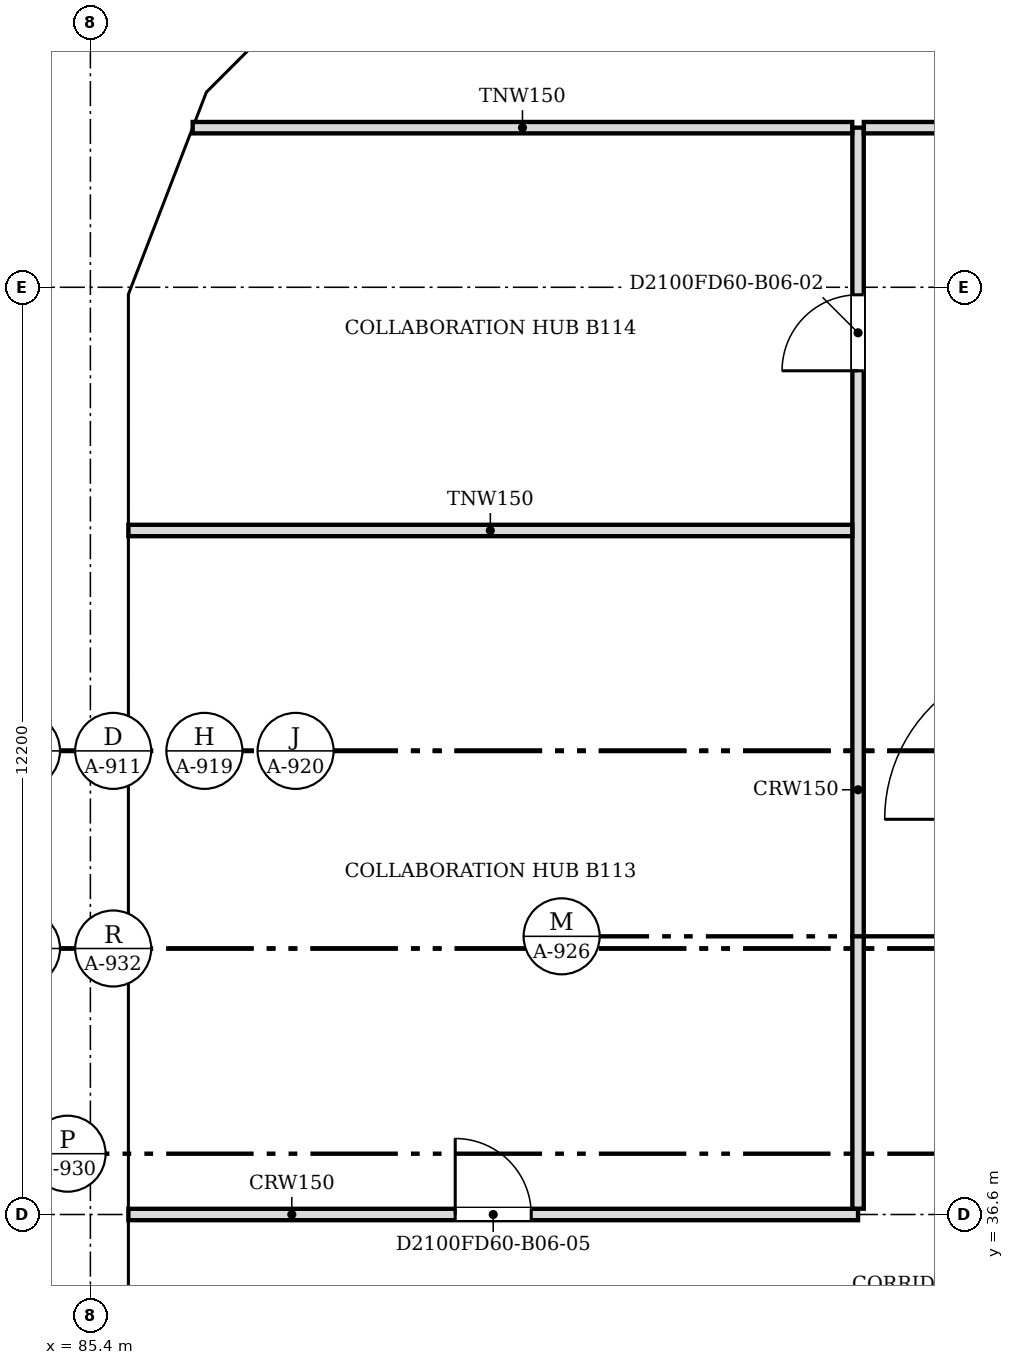
"""IFC4 building model, lengths in metres.
Left out: names, types, materials, properties, quantities, classifications, styles, units other than length and angle.
Written with IfcOpenShell. Run it as: python <this file> out.ifc"""

import sys

from ifc_helpers import new_model, si_unit, direction, frame, frame_2d, origin, place, context, subcontext, project, spatial, polyline, rectangle, outline, extrude, faceted_brep, source, transform, mapped, element, fill, save


model = new_model("IFC4")
c1 = context("Model", 3, precision=1e-05, world=origin(), true_north=direction((0.0, 1.0)))
c2 = subcontext(c1, "Body", "Model", "MODEL_VIEW")
j1 = project(units=[si_unit("LENGTHUNIT", "METRE"), si_unit("PLANEANGLEUNIT", "RADIAN")], contexts=[c1])
p1 = place(None, origin())
s1 = spatial("IfcSite", under=j1, at=p1, CompositionType="ELEMENT")
p2 = place(p1, origin())
s2 = spatial("IfcBuilding", under=s1, at=p2, CompositionType="ELEMENT")
p3 = place(p2, frame((0.0, 0.0, 60.0)))
s3 = spatial("IfcBuildingStorey", under=s2, at=p3, CompositionType="ELEMENT", Elevation=60.0)
m1 = source(origin(), c2, "Body", "Brep", [
    faceted_brep([(0.053, -0.25, 0.0), (2.997, -0.25, 3.8), (0.053, -0.25, 7.6), (0.0, -0.25, 7.532), (0.0, -0.25, 0.068), (0.106, 0.25, 7.532), (2.944, 0.25, 3.868), (2.944, 0.25, 3.732), (0.106, 0.25, 0.068), (2.997, 0.0, 3.8), (0.053, 0.0, 0.0), (0.053, 0.0, 7.6)], [[[0, 1, 2, 3, 4]], [[5, 6, 7, 8]], [[8, 7, 9, 1, 0, 10]], [[6, 5, 11, 2, 1, 9]], [[3, 2, 11]], [[10, 0, 4]], [[8, 10, 4, 3, 11, 5]], [[9, 7, 6]]]),
])
p4 = place(p3, frame((88.831, 53.625, -3.8), z_axis=(0.0, 0.0, 1.0), x_axis=(-0.707147509625, -0.707066050402, 0.0)))
e1 = element("IfcWall", 1, at=p4, inside=s3, PredefinedType="SOLIDWALL", context=c2, shape_type="MappedRepresentation", body=[
    mapped(m1, transform((0.0, 0.0, 0.0), scale=1.0)),
])
m2 = source(origin(), c2, "Body", "SweptSolid", [
    extrude(outline(polyline([(0.253, 0.666), (2.681, 3.8), (0.253, 6.934), (0.253, 0.666)])), frame((0.0, 0.26, 0.0), z_axis=(0.0, -1.0, 0.0), x_axis=(1.0, 0.0, 0.0)), (0.0, 0.0, 1.0), 0.52),
])
p5 = place(p4, origin())
e2 = element("IfcOpeningElement", 2, at=p5, cuts=e1, PredefinedType="OPENING", context=c2, shape_type="MappedRepresentation", body=[
    mapped(m2, transform((0.0, 0.0, 0.0), scale=1.0)),
])
m3 = source(origin(), c2, "Body", "Brep", [
    faceted_brep([(2.95, -0.25, 0.0), (2.997, -0.25, 0.059), (2.997, -0.25, 7.541), (2.95, -0.25, 7.6), (0.0, -0.25, 3.8), (0.053, 0.25, 3.868), (2.904, 0.25, 7.54), (2.904, 0.25, 0.06), (0.053, 0.25, 3.732), (2.95, 0.0, 0.0), (2.95, 0.0, 7.6), (0.0, 0.0, 3.8)], [[[0, 1, 2, 3, 4]], [[5, 6, 7, 8]], [[1, 0, 9]], [[10, 3, 2]], [[6, 5, 11, 4, 3, 10]], [[8, 7, 9, 0, 4, 11]], [[8, 11, 5]], [[1, 9, 7, 6, 10, 2]]]),
])
p6 = place(p3, frame((86.712, 51.506, -3.8), z_axis=(0.0, 0.0, 1.0), x_axis=(-0.359874094142, -0.933000876937, 0.0)))
e3 = element("IfcWall", 3, at=p6, inside=s3, PredefinedType="SOLIDWALL", context=c2, shape_type="MappedRepresentation", body=[
    mapped(m3, transform((0.0, 0.0, 0.0), scale=1.0)),
])
m4 = source(origin(), c2, "Body", "SweptSolid", [
    extrude(outline(polyline([(2.75, 6.935), (0.316, 3.8), (2.75, 0.665), (2.75, 6.935)])), frame((0.0, 0.26, 0.0), z_axis=(0.0, -1.0, 0.0), x_axis=(1.0, 0.0, 0.0)), (0.0, 0.0, 1.0), 0.52),
])
p7 = place(p6, origin())
e4 = element("IfcOpeningElement", 4, at=p7, cuts=e3, PredefinedType="OPENING", context=c2, shape_type="MappedRepresentation", body=[
    mapped(m4, transform((0.0, 0.0, 0.0), scale=1.0)),
])
m5 = source(origin(), c2, "Body", "Brep", [
    faceted_brep([(0.047, -0.25, 0.0), (3.05, -0.25, 3.8), (0.047, -0.25, 7.6), (0.0, -0.25, 7.54), (0.0, -0.25, 0.06), (0.093, 0.25, 7.541), (3.05, 0.25, 3.8), (0.093, 0.25, 0.059), (0.047, 0.0, 0.0), (0.047, 0.0, 7.6)], [[[0, 1, 2, 3, 4]], [[5, 6, 7]], [[7, 6, 1, 0, 8]], [[6, 5, 9, 2, 1]], [[3, 2, 9]], [[8, 0, 4]], [[7, 8, 4, 3, 9, 5]]]),
])
p8 = place(p3, frame((85.65, 48.8, -3.8), z_axis=(0.0, 0.0, 1.0), x_axis=(0.0, -1.0, 0.0)))
e5 = element("IfcWall", 5, at=p8, inside=s3, PredefinedType="SOLIDWALL", context=c2, shape_type="MappedRepresentation", body=[
    mapped(m5, transform((0.0, 0.0, 0.0), scale=1.0)),
])
m6 = source(origin(), c2, "Body", "SweptSolid", [
    extrude(outline(polyline([(0.247, 0.656), (2.731, 3.8), (0.247, 6.944), (0.247, 0.656)])), frame((0.0, 0.26, 0.0), z_axis=(0.0, -1.0, 0.0), x_axis=(1.0, 0.0, 0.0)), (0.0, 0.0, 1.0), 0.52),
])
p9 = place(p8, origin())
e6 = element("IfcOpeningElement", 6, at=p9, cuts=e5, PredefinedType="OPENING", context=c2, shape_type="MappedRepresentation", body=[
    mapped(m6, transform((0.0, 0.0, 0.0), scale=1.0)),
])
m7 = source(origin(), c2, "Body", "SweptSolid", [
    extrude(outline(polyline([(3.05, 0.0), (6.1, 3.8), (3.05, 7.6), (0.0, 3.8), (3.05, 0.0)])), frame((0.0, 0.25, 0.0), z_axis=(0.0, -1.0, 0.0), x_axis=(1.0, 0.0, 0.0)), (0.0, 0.0, 1.0), 0.5),
])
p10 = place(p3, frame((85.65, 45.75, -3.8), z_axis=(0.0, 0.0, 1.0), x_axis=(0.0, -1.0, 0.0)))
e7 = element("IfcWall", 7, at=p10, inside=s3, PredefinedType="SOLIDWALL", context=c2, shape_type="MappedRepresentation", body=[
    mapped(m7, transform((0.0, 0.0, 0.0), scale=1.0)),
])
m8 = source(origin(), c2, "Body", "SweptSolid", [
    extrude(outline(polyline([(3.05, 0.399), (5.78, 3.8), (3.05, 7.201), (0.321, 3.8), (3.05, 0.399)])), frame((0.0, 0.26, 0.0), z_axis=(0.0, -1.0, 0.0), x_axis=(1.0, 0.0, 0.0)), (0.0, 0.0, 1.0), 0.52),
])
p11 = place(p10, origin())
e8 = element("IfcOpeningElement", 8, at=p11, cuts=e7, PredefinedType="OPENING", context=c2, shape_type="MappedRepresentation", body=[
    mapped(m8, transform((0.0, 0.0, 0.0), scale=1.0)),
])
m9 = source(origin(), c2, "Body", "Brep", [
    faceted_brep([(3.05, -0.25, 0.0), (6.1, -0.25, 3.8), (6.1, -0.25, 3.8), (3.05, -0.25, 7.6), (0.0, -0.25, 3.8), (0.0, 0.25, 3.8), (3.05, 0.25, 7.6), (6.1, 0.25, 3.8), (6.1, 0.25, 3.8), (3.05, 0.25, 0.0)], [[[0, 1, 2, 3, 4]], [[5, 6, 7, 8, 9]], [[9, 8, 1, 0]], [[7, 6, 3, 2]], [[6, 5, 4, 3]], [[5, 9, 0, 4]], [[1, 8, 7, 2]]]),
])
p12 = place(p3, frame((85.65, 39.65, -3.8), z_axis=(0.0, 0.0, 1.0), x_axis=(0.0, -1.0, 0.0)))
e9 = element("IfcWall", 9, at=p12, inside=s3, PredefinedType="SOLIDWALL", context=c2, shape_type="MappedRepresentation", body=[
    mapped(m9, transform((0.0, 0.0, 0.0), scale=1.0)),
])
p13 = place(p12, origin())
e10 = element("IfcOpeningElement", 10, at=p13, cuts=e9, PredefinedType="OPENING", context=c2, shape_type="MappedRepresentation", body=[
    mapped(m8, transform((0.0, 0.0, 0.0), scale=1.0)),
])
m10 = source(origin(), c2, "Body", "Brep", [
    faceted_brep([(2.944, -0.25, 0.0), (2.997, -0.25, 0.068), (2.997, -0.25, 3.8), (0.0, -0.25, 3.8), (0.053, 0.25, 3.8), (2.891, 0.25, 3.8), (2.891, 0.25, 0.068), (0.053, 0.25, 3.732), (2.944, 0.0, 0.0), (0.0, 0.0, 3.8)], [[[0, 1, 2, 3]], [[4, 5, 6, 7]], [[1, 0, 8]], [[5, 4, 9, 3, 2]], [[7, 6, 8, 0, 3, 9]], [[7, 9, 4]], [[1, 8, 6, 5, 2]]]),
])
p14 = place(p3, frame((88.794, 53.588, 0.0), z_axis=(0.0, 0.0, 1.0), x_axis=(-0.707066050402, -0.707147509625, 0.0)))
e11 = element("IfcWall", 11, at=p14, inside=s3, PredefinedType="SOLIDWALL", context=c2, shape_type="MappedRepresentation", body=[
    mapped(m10, transform((0.0, 0.0, 0.0), scale=1.0)),
])
m11 = source(origin(), c2, "Body", "SweptSolid", [
    extrude(outline(polyline([(2.744, 3.55), (0.51, 3.55), (2.744, 0.666), (2.744, 3.55)])), frame((0.0, 0.26, 0.0), z_axis=(0.0, -1.0, 0.0), x_axis=(1.0, 0.0, 0.0)), (0.0, 0.0, 1.0), 0.52),
])
p15 = place(p14, origin())
e12 = element("IfcOpeningElement", 12, at=p15, cuts=e11, PredefinedType="OPENING", context=c2, shape_type="MappedRepresentation", body=[
    mapped(m11, transform((0.0, 0.0, 0.0), scale=1.0)),
])
m12 = source(origin(), c2, "Body", "Brep", [
    faceted_brep([(0.053, -0.25, 0.0), (3.003, -0.25, 3.8), (0.0, -0.25, 3.8), (0.0, -0.25, 0.068), (0.106, 0.25, 3.8), (2.957, 0.25, 3.8), (2.957, 0.25, 3.74), (0.106, 0.25, 0.068), (3.003, 0.0, 3.8), (0.053, 0.0, 0.0)], [[[0, 1, 2, 3]], [[4, 5, 6, 7]], [[7, 6, 8, 1, 0, 9]], [[5, 4, 2, 1, 8]], [[9, 0, 3]], [[7, 9, 3, 2, 4]], [[6, 5, 8]]]),
])
p16 = place(p3, frame((86.731, 51.556, 0.0), z_axis=(0.0, 0.0, 1.0), x_axis=(-0.359855894603, -0.933007896601, 0.0)))
e13 = element("IfcWall", 13, at=p16, inside=s3, PredefinedType="SOLIDWALL", context=c2, shape_type="MappedRepresentation", body=[
    mapped(m12, transform((0.0, 0.0, 0.0), scale=1.0)),
])
m13 = source(origin(), c2, "Body", "SweptSolid", [
    extrude(outline(polyline([(0.253, 0.665), (2.493, 3.55), (0.253, 3.55), (0.253, 0.665)])), frame((0.0, 0.26, 0.0), z_axis=(0.0, -1.0, 0.0), x_axis=(1.0, 0.0, 0.0)), (0.0, 0.0, 1.0), 0.52),
])
p17 = place(p16, origin())
e14 = element("IfcOpeningElement", 14, at=p17, cuts=e13, PredefinedType="OPENING", context=c2, shape_type="MappedRepresentation", body=[
    mapped(m13, transform((0.0, 0.0, 0.0), scale=1.0)),
])
m14 = source(origin(), c2, "Body", "Brep", [
    faceted_brep([(3.003, -0.25, 0.0), (6.053, -0.25, 3.8), (0.0, -0.25, 3.8), (0.047, 0.25, 3.8), (6.053, 0.25, 3.8), (3.003, 0.25, 0.0), (0.047, 0.25, 3.741), (0.0, 0.0, 3.8)], [[[0, 1, 2]], [[3, 4, 5, 6]], [[5, 4, 1, 0]], [[4, 3, 7, 2, 1]], [[6, 5, 0, 2, 7]], [[6, 7, 3]]]),
])
p18 = place(p3, frame((85.65, 48.753, 0.0), z_axis=(0.0, 0.0, 1.0), x_axis=(0.0, -1.0, 0.0)))
e15 = element("IfcWall", 15, at=p18, inside=s3, PredefinedType="SOLIDWALL", context=c2, shape_type="MappedRepresentation", body=[
    mapped(m14, transform((0.0, 0.0, 0.0), scale=1.0)),
])
m15 = source(origin(), c2, "Body", "SweptSolid", [
    extrude(outline(polyline([(3.005, 0.401), (5.532, 3.55), (0.516, 3.55), (3.005, 0.401)])), frame((0.0, 0.26, 0.0), z_axis=(0.0, -1.0, 0.0), x_axis=(1.0, 0.0, 0.0)), (0.0, 0.0, 1.0), 0.52),
])
p19 = place(p18, origin())
e16 = element("IfcOpeningElement", 16, at=p19, cuts=e15, PredefinedType="OPENING", context=c2, shape_type="MappedRepresentation", body=[
    mapped(m15, transform((0.0, 0.0, 0.0), scale=1.0)),
])
m16 = source(origin(), c2, "Body", "Brep", [
    faceted_brep([(3.05, -0.25, 0.0), (6.1, -0.25, 3.8), (6.1, -0.25, 3.8), (0.0, -0.25, 3.8), (0.0, 0.25, 3.8), (6.1, 0.25, 3.8), (6.1, 0.25, 3.8), (3.05, 0.25, 0.0)], [[[0, 1, 2, 3]], [[4, 5, 6, 7]], [[7, 6, 1, 0]], [[5, 4, 3, 2]], [[4, 7, 0, 3]], [[1, 6, 5, 2]]]),
])
p20 = place(p3, frame((85.65, 42.7, 0.0), z_axis=(0.0, 0.0, 1.0), x_axis=(0.0, -1.0, 0.0)))
e17 = element("IfcWall", 17, at=p20, inside=s3, PredefinedType="SOLIDWALL", context=c2, shape_type="MappedRepresentation", body=[
    mapped(m16, transform((0.0, 0.0, 0.0), scale=1.0)),
])
m17 = source(origin(), c2, "Body", "SweptSolid", [
    extrude(outline(polyline([(3.05, 0.399), (5.579, 3.55), (0.521, 3.55), (3.05, 0.399)])), frame((0.0, 0.26, 0.0), z_axis=(0.0, -1.0, 0.0), x_axis=(1.0, 0.0, 0.0)), (0.0, 0.0, 1.0), 0.52),
])
p21 = place(p20, origin())
e18 = element("IfcOpeningElement", 18, at=p21, cuts=e17, PredefinedType="OPENING", context=c2, shape_type="MappedRepresentation", body=[
    mapped(m17, transform((0.0, 0.0, 0.0), scale=1.0)),
])
m18 = source(origin(), c2, "Body", "SweptSolid", [
    extrude(outline(polyline([(3.05, 0.0), (6.1, 3.8), (0.0, 3.8), (3.05, 0.0)])), frame((0.0, 0.25, 0.0), z_axis=(0.0, -1.0, 0.0), x_axis=(1.0, 0.0, 0.0)), (0.0, 0.0, 1.0), 0.5),
])
p22 = place(p3, frame((85.65, 36.6, 0.0), z_axis=(0.0, 0.0, 1.0), x_axis=(0.0, -1.0, 0.0)))
e19 = element("IfcWall", 19, at=p22, inside=s3, PredefinedType="SOLIDWALL", context=c2, shape_type="MappedRepresentation", body=[
    mapped(m18, transform((0.0, 0.0, 0.0), scale=1.0)),
])
p23 = place(p22, origin())
e20 = element("IfcOpeningElement", 20, at=p23, cuts=e19, PredefinedType="OPENING", context=c2, shape_type="MappedRepresentation", body=[
    mapped(m17, transform((0.0, 0.0, 0.0), scale=1.0)),
])
p24 = place(p3, frame((85.9, 36.6, 0.0), z_axis=(0.0, 0.0, 1.0), x_axis=(1.0, 0.0, 0.0)))
e21 = element("IfcWall", 21, at=p24, inside=s3, PredefinedType="PARTITIONING", context=c2, shape_type="SweptSolid", body=[
    extrude(rectangle(XDim=9.6, YDim=0.15, at=frame_2d((4.8, 0.0))), origin(), (0.0, 0.0, 1.0), 2.888),
])
m19 = source(origin(), c2, "Body", "SweptSolid", [
    extrude(rectangle(XDim=1.0, YDim=2.1, at=frame_2d((0.5, 1.05))), frame((0.0, 0.085, 0.0), z_axis=(0.0, -1.0, 0.0), x_axis=(1.0, 0.0, 0.0)), (0.0, 0.0, 1.0), 0.17),
])
p25 = place(p24, frame((4.3, 0.0, 0.0)))
e22 = element("IfcOpeningElement", 22, at=p25, cuts=e21, PredefinedType="OPENING", context=c2, shape_type="MappedRepresentation", body=[
    mapped(m19, transform((0.0, 0.0, 0.0), scale=1.0)),
])
p26 = place(p3, frame((95.5, 36.676, 0.0), z_axis=(0.0, 0.0, 1.0), x_axis=(0.0, 1.0, 0.0)))
e23 = element("IfcWall", 23, at=p26, inside=s3, PredefinedType="PARTITIONING", context=c2, shape_type="SweptSolid", body=[
    extrude(rectangle(XDim=14.224, YDim=0.15, at=frame_2d((7.112, 0.0))), origin(), (0.0, 0.0, 1.0), 2.888),
])
p27 = place(p26, frame((11.025, 0.0, 0.0)))
e24 = element("IfcOpeningElement", 24, at=p27, cuts=e23, PredefinedType="OPENING", context=c2, shape_type="MappedRepresentation", body=[
    mapped(m19, transform((0.0, 0.0, 0.0), scale=1.0)),
])
p28 = place(p3, frame((85.9, 45.6, 0.0), z_axis=(0.0, 0.0, 1.0), x_axis=(1.0, 0.0, 0.0)))
e25 = element("IfcWall", 25, at=p28, inside=s3, PredefinedType="PARTITIONING", context=c2, shape_type="SweptSolid", body=[
    extrude(rectangle(XDim=9.524, YDim=0.15, at=frame_2d((4.762, 0.0))), origin(), (0.0, 0.0, 1.0), 2.888),
])
p29 = place(p3, frame((86.746, 50.9, 0.0), z_axis=(0.0, 0.0, 1.0), x_axis=(1.0, 0.0, 0.0)))
e26 = element("IfcWall", 26, at=p29, inside=s3, PredefinedType="PARTITIONING", context=c2, shape_type="SweptSolid", body=[
    extrude(rectangle(XDim=8.678, YDim=0.15, at=frame_2d((4.339, 0.0))), origin(), (0.0, 0.0, 1.0), 2.888),
])
p30 = place(p3, frame((95.576, 50.9, 0.0), z_axis=(0.0, 0.0, 1.0), x_axis=(1.0, 0.0, 0.0)))
e27 = element("IfcWall", 27, at=p30, inside=s3, PredefinedType="PARTITIONING", context=c2, shape_type="SweptSolid", body=[
    extrude(rectangle(XDim=4.424, YDim=0.15, at=frame_2d((2.212, 0.0))), origin(), (0.0, 0.0, 1.0), 2.888),
])
m20 = source(origin(), c2, "Body", "SweptSolid", [
    extrude(rectangle(XDim=1.0, YDim=2.1, at=frame_2d((0.5, 1.05))), frame((0.0, 0.025, 0.0), z_axis=(0.0, -1.0, 0.0), x_axis=(1.0, 0.0, 0.0)), (0.0, 0.0, 1.0), 0.05),
])
p31 = place(p27, origin())
e28 = element("IfcDoor", 28, at=p31, inside=s3, OperationType="SINGLE_SWING_LEFT", PredefinedType="DOOR", context=c2, shape_type="MappedRepresentation", body=[
    mapped(m20, transform((0.0, 0.0, 0.0), scale=1.0)),
])
fill(e24, e28)
p32 = place(p25, origin())
e29 = element("IfcDoor", 29, at=p32, inside=s3, OperationType="SINGLE_SWING_LEFT", PredefinedType="DOOR", context=c2, shape_type="MappedRepresentation", body=[
    mapped(m20, transform((0.0, 0.0, 0.0), scale=1.0)),
])
fill(e22, e29)
save(model, sys.argv[1])
